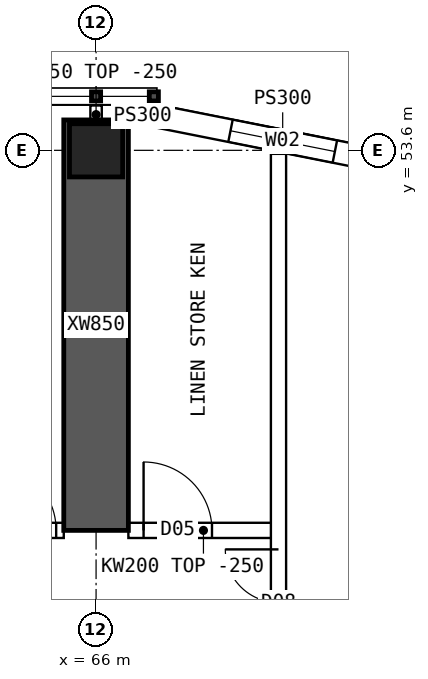
"""IFC4 building model, lengths in metres.
Left out: names, types, materials, properties, quantities, classifications, styles, units other than length and angle.
Written with IfcOpenShell. Run it as: python <this file> out.ifc"""

import sys

from ifc_helpers import new_model, si_unit, direction, frame, frame_2d, origin, origin_2d, place, context, subcontext, project, spatial, polyline, rectangle, hollow_rectangle, outline, extrude, element, fill, save


model = new_model("IFC4")
c1 = context("Model", 3, precision=1e-05, world=origin(), true_north=direction((0.0, 1.0)))
c2 = subcontext(c1, "Body", "Model", "MODEL_VIEW")
j1 = project(units=[si_unit("LENGTHUNIT", "METRE"), si_unit("PLANEANGLEUNIT", "RADIAN")], contexts=[c1])
p1 = place(None, origin())
s1 = spatial("IfcSite", under=j1, at=p1, CompositionType="ELEMENT")
p2 = place(p1, origin())
s2 = spatial("IfcBuilding", under=s1, at=p2, CompositionType="ELEMENT")
p3 = place(p2, frame((0.0, 0.0, 163.6)))
s3 = spatial("IfcBuildingStorey", under=s2, at=p3, CompositionType="ELEMENT", Elevation=163.6)
p4 = place(p3, frame((66.0, 53.6, 0.0), z_axis=(0.0, 0.0, 1.0), x_axis=(1.0, 0.0, 0.0)))
e1 = element("IfcColumn", 1, at=p4, inside=s3, PredefinedType="COLUMN", context=c2, shape_type="SweptSolid", body=[
    extrude(hollow_rectangle(XDim=0.7, YDim=0.7, WallThickness=0.07, at=origin_2d()), origin(), (0.0, 0.0, 1.0), 3.75),
])
p5 = place(p3, frame((66.0, 48.6, 0.0), z_axis=(0.0, 0.0, 1.0), x_axis=(0.0, 1.0, 0.0)))
e2 = element("IfcWall", 2, at=p5, inside=s3, PredefinedType="SHEAR", context=c2, shape_type="SweptSolid", body=[
    extrude(rectangle(XDim=5.4, YDim=0.85, at=frame_2d((2.7, 0.0))), origin(), (0.0, 0.0, 1.0), 3.75),
])
p6 = place(p3, frame((70.11, 53.392, 0.0), z_axis=(0.0, 0.0, 1.0), x_axis=(-0.98078325777, 0.195100490205, 0.0)))
e3 = element("IfcWall", 3, at=p6, inside=s3, PredefinedType="SOLIDWALL", context=c2, shape_type="SweptSolid", body=[
    extrude(outline(polyline([(-0.03, -0.15), (3.405, -0.15), (3.345, 0.15), (0.03, 0.15), (-0.03, -0.15)])), origin(), (0.0, 0.0, 1.0), 3.5),
])
p7 = place(p6, frame((0.988, 0.0, 0.9)))
e4 = element("IfcOpeningElement", 4, at=p7, cuts=e3, PredefinedType="OPENING", context=c2, shape_type="SweptSolid", body=[
    extrude(rectangle(XDim=1.4, YDim=1.8, at=frame_2d((0.7, 0.9))), frame((0.0, 0.16, 0.0), z_axis=(0.0, -1.0, 0.0), x_axis=(1.0, 0.0, 0.0)), (0.0, 0.0, 1.0), 0.32),
])
p8 = place(p3, frame((66.8, 54.05, 0.0), z_axis=(0.0, 0.0, 1.0), x_axis=(-1.0, 0.0, 0.0)))
e5 = element("IfcWall", 5, at=p8, inside=s3, PredefinedType="SOLIDWALL", context=c2, shape_type="SweptSolid", body=[
    extrude(rectangle(XDim=0.375, YDim=0.3, at=frame_2d((0.188, 0.0))), origin(), (0.0, 0.0, 1.0), 3.5),
])
p9 = place(p3, frame((60.425, 48.6, 0.0), z_axis=(0.0, 0.0, 1.0), x_axis=(1.0, 0.0, 0.0)))
e6 = element("IfcWall", 6, at=p9, inside=s3, PredefinedType="SOLIDWALL", context=c2, shape_type="SweptSolid", body=[
    extrude(outline(polyline([(0.0, 0.0), (5.15, 0.0), (5.15, 3.1), (0.0, 3.1), (0.0, 0.0)])), frame((0.0, 0.1, 0.0), z_axis=(0.0, -1.0, 0.0), x_axis=(1.0, 0.0, 0.0)), (0.0, 0.0, 1.0), 0.2),
])
p10 = place(p9, frame((0.1, 0.0, 0.0)))
e7 = element("IfcOpeningElement", 7, at=p10, cuts=e6, PredefinedType="OPENING", context=c2, shape_type="SweptSolid", body=[
    extrude(rectangle(XDim=0.9, YDim=2.1, at=frame_2d((0.45, 1.05))), frame((0.0, 0.11, 0.0), z_axis=(0.0, -1.0, 0.0), x_axis=(1.0, 0.0, 0.0)), (0.0, 0.0, 1.0), 0.22),
])
p11 = place(p9, frame((4.15, 0.0, 0.0)))
e8 = element("IfcOpeningElement", 8, at=p11, cuts=e6, PredefinedType="OPENING", context=c2, shape_type="SweptSolid", body=[
    extrude(rectangle(XDim=0.9, YDim=2.1, at=frame_2d((0.45, 1.05))), frame((0.0, 0.11, 0.0), z_axis=(0.0, -1.0, 0.0), x_axis=(1.0, 0.0, 0.0)), (0.0, 0.0, 1.0), 0.22),
])
p12 = place(p3, frame((66.425, 48.6, 0.0), z_axis=(0.0, 0.0, 1.0), x_axis=(1.0, 0.0, 0.0)))
e9 = element("IfcWall", 9, at=p12, inside=s3, PredefinedType="SOLIDWALL", context=c2, shape_type="SweptSolid", body=[
    extrude(rectangle(XDim=1.975, YDim=0.2, at=frame_2d((0.987, 0.0))), origin(), (0.0, 0.0, 1.0), 3.5),
])
p13 = place(p12, frame((0.2, 0.0, 0.0)))
e10 = element("IfcOpeningElement", 10, at=p13, cuts=e9, PredefinedType="OPENING", context=c2, shape_type="SweptSolid", body=[
    extrude(rectangle(XDim=0.9, YDim=2.1, at=frame_2d((0.45, 1.05))), frame((0.0, 0.11, 0.0), z_axis=(0.0, -1.0, 0.0), x_axis=(1.0, 0.0, 0.0)), (0.0, 0.0, 1.0), 0.22),
])
p14 = place(p3, frame((68.4, 10.446, 0.0), z_axis=(0.0, 0.0, 1.0), x_axis=(0.0, 1.0, 0.0)))
e11 = element("IfcWall", 11, at=p14, inside=s3, PredefinedType="SOLIDWALL", context=c2, shape_type="SweptSolid", body=[
    extrude(rectangle(XDim=43.107, YDim=0.2, at=frame_2d((21.554, 0.0))), origin(), (0.0, 0.0, 1.0), 3.5),
])
p15 = place(p14, frame((13.914, 0.0, 0.0)))
e12 = element("IfcOpeningElement", 12, at=p15, cuts=e11, PredefinedType="OPENING", context=c2, shape_type="SweptSolid", body=[
    extrude(rectangle(XDim=1.2, YDim=2.1, at=frame_2d((0.6, 1.05))), frame((0.0, 0.11, 0.0), z_axis=(0.0, -1.0, 0.0), x_axis=(1.0, 0.0, 0.0)), (0.0, 0.0, 1.0), 0.22),
])
p16 = place(p14, frame((22.634, 0.0, 0.0)))
e13 = element("IfcOpeningElement", 13, at=p16, cuts=e11, PredefinedType="OPENING", context=c2, shape_type="SweptSolid", body=[
    extrude(rectangle(XDim=1.2, YDim=2.1, at=frame_2d((0.6, 1.05))), frame((0.0, 0.11, 0.0), z_axis=(0.0, -1.0, 0.0), x_axis=(1.0, 0.0, 0.0)), (0.0, 0.0, 1.0), 0.22),
])
p17 = place(p14, frame((5.104, 0.0, 0.0)))
e14 = element("IfcOpeningElement", 14, at=p17, cuts=e11, PredefinedType="OPENING", context=c2, shape_type="SweptSolid", body=[
    extrude(rectangle(XDim=1.4, YDim=2.1, at=frame_2d((0.7, 1.05))), frame((0.0, 0.11, 0.0), z_axis=(0.0, -1.0, 0.0), x_axis=(1.0, 0.0, 0.0)), (0.0, 0.0, 1.0), 0.22),
])
p18 = place(p14, frame((36.504, 0.0, 0.0)))
e15 = element("IfcOpeningElement", 15, at=p18, cuts=e11, PredefinedType="OPENING", context=c2, shape_type="SweptSolid", body=[
    extrude(rectangle(XDim=1.4, YDim=2.1, at=frame_2d((0.7, 1.05))), frame((0.0, 0.11, 0.0), z_axis=(0.0, -1.0, 0.0), x_axis=(1.0, 0.0, 0.0)), (0.0, 0.0, 1.0), 0.22),
])
p19 = place(p3, frame((66.0, 53.95, 0.0), z_axis=(0.0, 0.0, 1.0), x_axis=(0.0, 1.0, 0.0)))
e16 = element("IfcWall", 16, at=p19, inside=s3, PredefinedType="PARTITIONING", context=c2, shape_type="SweptSolid", body=[
    extrude(rectangle(XDim=0.24, YDim=0.15, at=frame_2d((0.12, 0.0))), origin(), (0.0, 0.0, 1.0), 3.5),
])
p20 = place(p7, origin())
e17 = element("IfcWindow", 17, at=p20, inside=s3, PartitioningType="SINGLE_PANEL", PredefinedType="WINDOW", context=c2, shape_type="SweptSolid", body=[
    extrude(rectangle(XDim=1.4, YDim=1.8, at=frame_2d((0.7, 0.9))), frame((0.0, 0.03, 0.0), z_axis=(0.0, -1.0, 0.0), x_axis=(1.0, 0.0, 0.0)), (0.0, 0.0, 1.0), 0.06),
])
fill(e4, e17)
p21 = place(p11, origin())
e18 = element("IfcDoor", 18, at=p21, inside=s3, OperationType="SINGLE_SWING_LEFT", PredefinedType="DOOR", context=c2, shape_type="SweptSolid", body=[
    extrude(rectangle(XDim=0.9, YDim=2.1, at=frame_2d((0.45, 1.05))), frame((0.0, 0.025, 0.0), z_axis=(0.0, -1.0, 0.0), x_axis=(1.0, 0.0, 0.0)), (0.0, 0.0, 1.0), 0.05),
])
fill(e8, e18)
p22 = place(p18, origin())
e19 = element("IfcDoor", 19, at=p22, inside=s3, OperationType="DOUBLE_DOOR_SINGLE_SWING", PredefinedType="DOOR", context=c2, shape_type="SweptSolid", body=[
    extrude(rectangle(XDim=1.4, YDim=2.1, at=frame_2d((0.7, 1.05))), frame((0.0, 0.025, 0.0), z_axis=(0.0, -1.0, 0.0), x_axis=(1.0, 0.0, 0.0)), (0.0, 0.0, 1.0), 0.05),
])
fill(e15, e19)
p23 = place(p13, origin())
e20 = element("IfcDoor", 20, at=p23, inside=s3, OperationType="SINGLE_SWING_LEFT", PredefinedType="DOOR", context=c2, shape_type="SweptSolid", body=[
    extrude(rectangle(XDim=0.9, YDim=2.1, at=frame_2d((0.45, 1.05))), frame((0.0, 0.025, 0.0), z_axis=(0.0, -1.0, 0.0), x_axis=(1.0, 0.0, 0.0)), (0.0, 0.0, 1.0), 0.05),
])
fill(e10, e20)
save(model, sys.argv[1])
